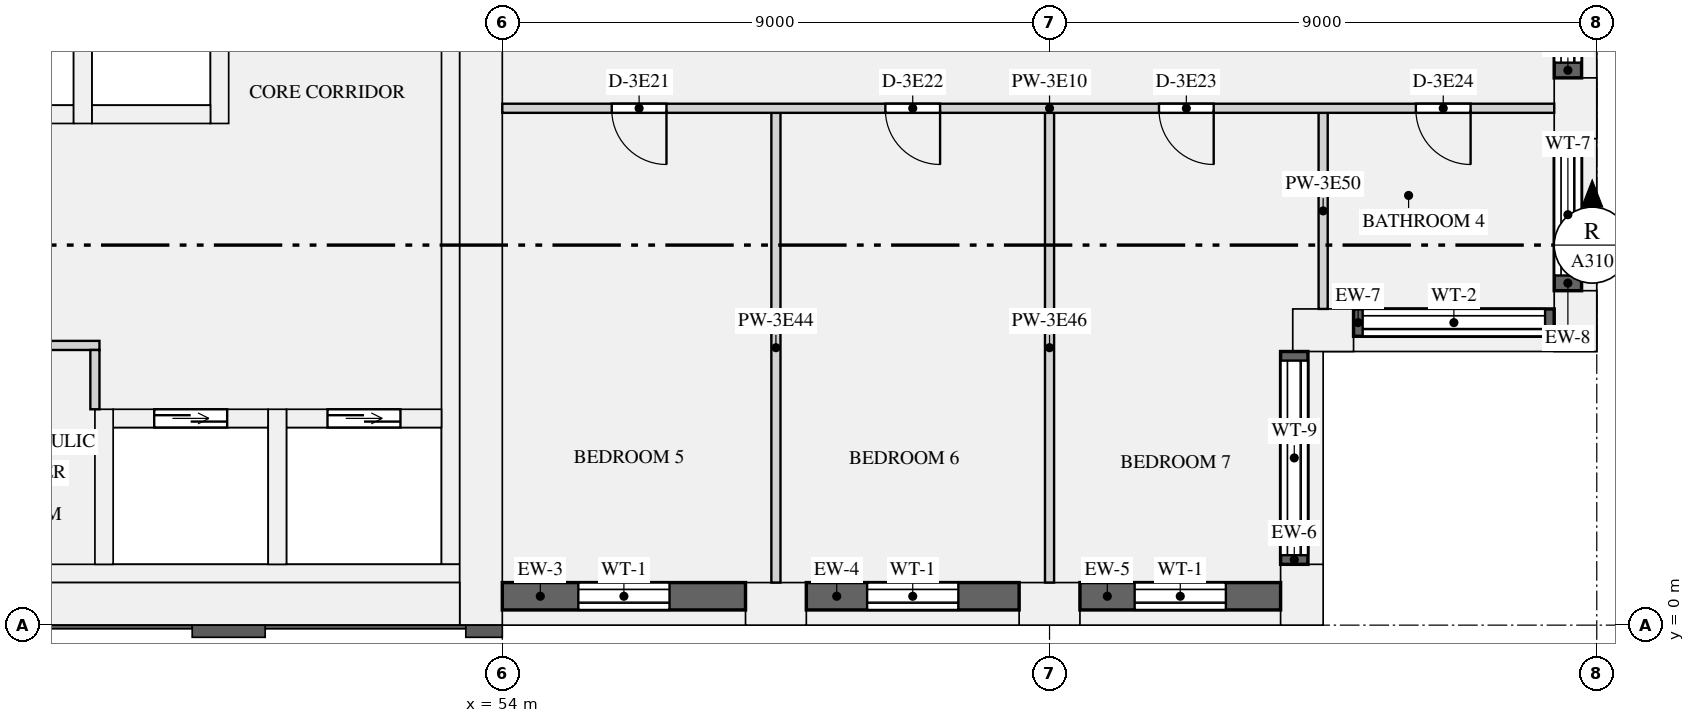
"""IFC4 building model, lengths in metres.
Left out: names, types, materials, properties, quantities, classifications, styles, units other than length and angle.
Written with IfcOpenShell. Run it as: python <this file> out.ifc"""

import sys

from ifc_helpers import new_model, si_unit, direction, frame, frame_2d, origin, origin_2d, place, context, subcontext, project, spatial, rectangle, extrude, element, fill, save


model = new_model("IFC4")
c1 = context("Model", 3, precision=1e-05, world=origin(), true_north=direction((0.0, 1.0)))
c2 = subcontext(c1, "Body", "Model", "MODEL_VIEW")
j1 = project(units=[si_unit("LENGTHUNIT", "METRE"), si_unit("PLANEANGLEUNIT", "RADIAN")], contexts=[c1])
p1 = place(None, origin())
s1 = spatial("IfcSite", under=j1, at=p1, CompositionType="ELEMENT")
p2 = place(p1, origin())
s2 = spatial("IfcBuilding", under=s1, at=p2, CompositionType="ELEMENT")
p3 = place(p2, frame((0.0, 0.0, 172.8)))
s3 = spatial("IfcBuildingStorey", under=s2, at=p3, CompositionType="ELEMENT", Elevation=172.8)
for number, where, z_axis, x_axis in (
    (1, (58.5, 0.35, 0.0), (0.0, 0.0, 1.0), (1.0, 0.0, 0.0)),
    (2, (63.0, 0.35, 0.0), (0.0, 0.0, 1.0), (1.0, 0.0, 0.0)),
    (3, (67.15, 0.5, 0.0), (0.0, 0.0, 1.0), (0.0, 1.0, 0.0)),
    (4, (67.5, 4.85, 0.0), (0.0, 0.0, 1.0), (1.0, 0.0, 0.0)),
    (5, (71.65, 5.0, 0.0), (0.0, 0.0, 1.0), (0.0, 1.0, 0.0)),
    (6, (71.65, 8.5, 0.0), (0.0, 0.0, 1.0), (0.0, 1.0, 0.0)),
):
    element("IfcColumn", number, at=place(p3, frame(where, z_axis=z_axis, x_axis=x_axis)), inside=s3, PredefinedType="USERDEFINED", context=c2, shape_type="SweptSolid", body=[
        extrude(rectangle(XDim=1.0, YDim=0.7, at=origin_2d()), origin(), (0.0, 0.0, 1.0), 3.15),
    ])
p4 = place(p3, frame((53.65, 0.0, 0.0), z_axis=(0.0, 0.0, 1.0), x_axis=(0.0, 1.0, 0.0)))
e7 = element("IfcWall", 7, at=p4, inside=s3, PredefinedType="SHEAR", context=c2, shape_type="SweptSolid", body=[
    extrude(rectangle(XDim=12.5, YDim=0.7, at=frame_2d((6.25, 0.0))), origin(), (0.0, 0.0, 1.0), 3.15),
])
p5 = place(p3, frame((18.7, 0.35, 0.0), z_axis=(0.0, 0.0, 1.0), x_axis=(1.0, 0.0, 0.0)))
e8 = element("IfcWall", 8, at=p5, inside=s3, PredefinedType="SHEAR", context=c2, shape_type="SweptSolid", body=[
    extrude(rectangle(XDim=34.6, YDim=0.7, at=frame_2d((17.3, 0.0))), origin(), (0.0, 0.0, 1.0), 3.15),
])
p6 = place(p3, frame((53.15, 1.0, 0.0), z_axis=(0.0, 0.0, 1.0), x_axis=(0.0, 1.0, 0.0)))
e9 = element("IfcWall", 9, at=p6, inside=s3, PredefinedType="SHEAR", context=c2, shape_type="SweptSolid", body=[
    extrude(rectangle(XDim=10.9, YDim=0.3, at=frame_2d((5.45, 0.0))), origin(), (0.0, 0.0, 1.0), 3.15),
])
p7 = place(p3, frame((18.7, 0.85, 0.0), z_axis=(0.0, 0.0, 1.0), x_axis=(1.0, 0.0, 0.0)))
e10 = element("IfcWall", 10, at=p7, inside=s3, PredefinedType="SHEAR", context=c2, shape_type="SweptSolid", body=[
    extrude(rectangle(XDim=34.6, YDim=0.3, at=frame_2d((17.3, 0.0))), origin(), (0.0, 0.0, 1.0), 3.15),
])
for number, where, z_axis, x_axis in (
    (11, (45.0, 8.4, 0.0), (0.0, 0.0, 1.0), (1.0, 0.0, 0.0)),
    (12, (47.25, 8.4, 0.0), (0.0, 0.0, 1.0), (1.0, 0.0, 0.0)),
):
    element("IfcWall", number, at=place(p3, frame(where, z_axis=z_axis, x_axis=x_axis)), inside=s3, PredefinedType="SHEAR", context=c2, shape_type="SweptSolid", body=[
        extrude(rectangle(XDim=1.95, YDim=0.3, at=frame_2d((0.975, 0.0))), origin(), (0.0, 0.0, 1.0), 3.15),
    ])
for number, where, z_axis, x_axis in (
    (13, (47.1, 8.25, 0.0), (0.0, 0.0, 1.0), (0.0, 1.0, 0.0)),
    (14, (49.35, 8.25, 0.0), (0.0, 0.0, 1.0), (0.0, 1.0, 0.0)),
):
    element("IfcWall", number, at=place(p3, frame(where, z_axis=z_axis, x_axis=x_axis)), inside=s3, PredefinedType="SHEAR", context=c2, shape_type="SweptSolid", body=[
        extrude(rectangle(XDim=3.65, YDim=0.3, at=frame_2d((1.825, 0.0))), origin(), (0.0, 0.0, 1.0), 3.15),
    ])
p8 = place(p3, frame((47.6, 3.4, 0.0), z_axis=(0.0, 0.0, 1.0), x_axis=(1.0, 0.0, 0.0)))
e15 = element("IfcWall", 15, at=p8, inside=s3, PredefinedType="SHEAR", context=c2, shape_type="SweptSolid", body=[
    extrude(rectangle(XDim=2.55, YDim=0.3, at=frame_2d((1.275, 0.0))), origin(), (0.0, 0.0, 1.0), 3.15),
])
p9 = place(p8, frame((0.675, 0.0, 0.0)))
e16 = element("IfcOpeningElement", 16, at=p9, cuts=e15, PredefinedType="OPENING", context=c2, shape_type="SweptSolid", body=[
    extrude(rectangle(XDim=1.2, YDim=2.1, at=frame_2d((0.6, 1.05))), frame((0.0, 0.16, 0.0), z_axis=(0.0, -1.0, 0.0), x_axis=(1.0, 0.0, 0.0)), (0.0, 0.0, 1.0), 0.32),
])
p10 = place(p3, frame((47.45, 1.0, 0.0), z_axis=(0.0, 0.0, 1.0), x_axis=(0.0, 1.0, 0.0)))
e17 = element("IfcWall", 17, at=p10, inside=s3, PredefinedType="SHEAR", context=c2, shape_type="SweptSolid", body=[
    extrude(rectangle(XDim=2.55, YDim=0.3, at=frame_2d((1.275, 0.0))), origin(), (0.0, 0.0, 1.0), 3.15),
])
p11 = place(p3, frame((50.45, 3.4, 0.0), z_axis=(0.0, 0.0, 1.0), x_axis=(1.0, 0.0, 0.0)))
e18 = element("IfcWall", 18, at=p11, inside=s3, PredefinedType="SHEAR", context=c2, shape_type="SweptSolid", body=[
    extrude(rectangle(XDim=2.55, YDim=0.3, at=frame_2d((1.275, 0.0))), origin(), (0.0, 0.0, 1.0), 3.15),
])
p12 = place(p11, frame((0.675, 0.0, 0.0)))
e19 = element("IfcOpeningElement", 19, at=p12, cuts=e18, PredefinedType="OPENING", context=c2, shape_type="SweptSolid", body=[
    extrude(rectangle(XDim=1.2, YDim=2.1, at=frame_2d((0.6, 1.05))), frame((0.0, 0.16, 0.0), z_axis=(0.0, -1.0, 0.0), x_axis=(1.0, 0.0, 0.0)), (0.0, 0.0, 1.0), 0.32),
])
p13 = place(p3, frame((50.3, 1.0, 0.0), z_axis=(0.0, 0.0, 1.0), x_axis=(0.0, 1.0, 0.0)))
e20 = element("IfcWall", 20, at=p13, inside=s3, PredefinedType="SHEAR", context=c2, shape_type="SweptSolid", body=[
    extrude(rectangle(XDim=2.55, YDim=0.3, at=frame_2d((1.275, 0.0))), origin(), (0.0, 0.0, 1.0), 3.15),
])
p14 = place(p3, frame((54.0, 0.475, 0.9), z_axis=(0.0, 0.0, 1.0), x_axis=(1.0, 0.0, 0.0)))
e21 = element("IfcWall", 21, at=p14, inside=s3, PredefinedType="SOLIDWALL", context=c2, shape_type="SweptSolid", body=[
    extrude(rectangle(XDim=4.0, YDim=0.45, at=frame_2d((2.0, 0.0))), origin(), (0.0, 0.0, 1.0), 1.93),
])
p15 = place(p14, frame((1.25, 0.0, 0.15)))
e22 = element("IfcOpeningElement", 22, at=p15, cuts=e21, PredefinedType="OPENING", context=c2, shape_type="SweptSolid", body=[
    extrude(rectangle(XDim=1.5, YDim=1.5, at=frame_2d((0.75, 0.75))), frame((0.0, 0.235, 0.0), z_axis=(0.0, -1.0, 0.0), x_axis=(1.0, 0.0, 0.0)), (0.0, 0.0, 1.0), 0.47),
])
p16 = place(p3, frame((59.0, 0.475, 0.9), z_axis=(0.0, 0.0, 1.0), x_axis=(1.0, 0.0, 0.0)))
e23 = element("IfcWall", 23, at=p16, inside=s3, PredefinedType="SOLIDWALL", context=c2, shape_type="SweptSolid", body=[
    extrude(rectangle(XDim=3.5, YDim=0.45, at=frame_2d((1.75, 0.0))), origin(), (0.0, 0.0, 1.0), 1.93),
])
p17 = place(p16, frame((1.0, 0.0, 0.15)))
e24 = element("IfcOpeningElement", 24, at=p17, cuts=e23, PredefinedType="OPENING", context=c2, shape_type="SweptSolid", body=[
    extrude(rectangle(XDim=1.5, YDim=1.5, at=frame_2d((0.75, 0.75))), frame((0.0, 0.235, 0.0), z_axis=(0.0, -1.0, 0.0), x_axis=(1.0, 0.0, 0.0)), (0.0, 0.0, 1.0), 0.47),
])
p18 = place(p3, frame((63.5, 0.475, 0.9), z_axis=(0.0, 0.0, 1.0), x_axis=(1.0, 0.0, 0.0)))
e25 = element("IfcWall", 25, at=p18, inside=s3, PredefinedType="SOLIDWALL", context=c2, shape_type="SweptSolid", body=[
    extrude(rectangle(XDim=3.3, YDim=0.45, at=frame_2d((1.65, 0.0))), origin(), (0.0, 0.0, 1.0), 1.93),
])
p19 = place(p18, frame((0.9, 0.0, 0.15)))
e26 = element("IfcOpeningElement", 26, at=p19, cuts=e25, PredefinedType="OPENING", context=c2, shape_type="SweptSolid", body=[
    extrude(rectangle(XDim=1.5, YDim=1.5, at=frame_2d((0.75, 0.75))), frame((0.0, 0.235, 0.0), z_axis=(0.0, -1.0, 0.0), x_axis=(1.0, 0.0, 0.0)), (0.0, 0.0, 1.0), 0.47),
])
p20 = place(p3, frame((67.025, 1.0, 0.9), z_axis=(0.0, 0.0, 1.0), x_axis=(0.0, 1.0, 0.0)))
e27 = element("IfcWall", 27, at=p20, inside=s3, PredefinedType="SOLIDWALL", context=c2, shape_type="SweptSolid", body=[
    extrude(rectangle(XDim=3.5, YDim=0.45, at=frame_2d((1.75, 0.0))), origin(), (0.0, 0.0, 1.0), 1.93),
])
p21 = place(p20, frame((0.15, 0.0, 0.15)))
e28 = element("IfcOpeningElement", 28, at=p21, cuts=e27, PredefinedType="OPENING", context=c2, shape_type="SweptSolid", body=[
    extrude(rectangle(XDim=3.2, YDim=1.5, at=frame_2d((1.6, 0.75))), frame((0.0, 0.235, 0.0), z_axis=(0.0, -1.0, 0.0), x_axis=(1.0, 0.0, 0.0)), (0.0, 0.0, 1.0), 0.47),
])
p22 = place(p3, frame((68.0, 4.975, 0.9), z_axis=(0.0, 0.0, 1.0), x_axis=(1.0, 0.0, 0.0)))
e29 = element("IfcWall", 29, at=p22, inside=s3, PredefinedType="SOLIDWALL", context=c2, shape_type="SweptSolid", body=[
    extrude(rectangle(XDim=3.3, YDim=0.45, at=frame_2d((1.65, 0.0))), origin(), (0.0, 0.0, 1.0), 1.93),
])
p23 = place(p22, frame((0.15, 0.0, 0.15)))
e30 = element("IfcOpeningElement", 30, at=p23, cuts=e29, PredefinedType="OPENING", context=c2, shape_type="SweptSolid", body=[
    extrude(rectangle(XDim=3.0, YDim=1.5, at=frame_2d((1.5, 0.75))), frame((0.0, 0.235, 0.0), z_axis=(0.0, -1.0, 0.0), x_axis=(1.0, 0.0, 0.0)), (0.0, 0.0, 1.0), 0.47),
])
p24 = place(p3, frame((71.525, 5.5, 0.9), z_axis=(0.0, 0.0, 1.0), x_axis=(0.0, 1.0, 0.0)))
e31 = element("IfcWall", 31, at=p24, inside=s3, PredefinedType="SOLIDWALL", context=c2, shape_type="SweptSolid", body=[
    extrude(rectangle(XDim=2.5, YDim=0.45, at=frame_2d((1.25, 0.0))), origin(), (0.0, 0.0, 1.0), 1.93),
])
p25 = place(p24, frame((0.25, 0.0, 0.15)))
e32 = element("IfcOpeningElement", 32, at=p25, cuts=e31, PredefinedType="OPENING", context=c2, shape_type="SweptSolid", body=[
    extrude(rectangle(XDim=2.0, YDim=1.5, at=frame_2d((1.0, 0.75))), frame((0.0, 0.235, 0.0), z_axis=(0.0, -1.0, 0.0), x_axis=(1.0, 0.0, 0.0)), (0.0, 0.0, 1.0), 0.47),
])
p26 = place(p3, frame((71.525, 9.0, 0.9), z_axis=(0.0, 0.0, 1.0), x_axis=(0.0, 1.0, 0.0)))
e33 = element("IfcWall", 33, at=p26, inside=s3, PredefinedType="SOLIDWALL", context=c2, shape_type="SweptSolid", body=[
    extrude(rectangle(XDim=3.0, YDim=0.45, at=frame_2d((1.5, 0.0))), origin(), (0.0, 0.0, 1.0), 1.93),
])
p27 = place(p26, frame((0.25, 0.0, 0.15)))
e34 = element("IfcOpeningElement", 34, at=p27, cuts=e33, PredefinedType="OPENING", context=c2, shape_type="SweptSolid", body=[
    extrude(rectangle(XDim=2.5, YDim=1.5, at=frame_2d((1.25, 0.75))), frame((0.0, 0.235, 0.0), z_axis=(0.0, -1.0, 0.0), x_axis=(1.0, 0.0, 0.0)), (0.0, 0.0, 1.0), 0.47),
])
p28 = place(p3, frame((44.7, 4.6, 0.0), z_axis=(0.0, 0.0, 1.0), x_axis=(1.0, 0.0, 0.0)))
e35 = element("IfcWall", 35, at=p28, inside=s3, PredefinedType="PARTITIONING", context=c2, shape_type="SweptSolid", body=[
    extrude(rectangle(XDim=2.675, YDim=0.15, at=frame_2d((1.337, 0.0))), origin(), (0.0, 0.0, 1.0), 2.83),
])
p29 = place(p28, frame((0.35, 0.0, 0.0)))
e36 = element("IfcOpeningElement", 36, at=p29, cuts=e35, PredefinedType="OPENING", context=c2, shape_type="SweptSolid", body=[
    extrude(rectangle(XDim=0.9, YDim=2.1, at=frame_2d((0.45, 1.05))), frame((0.0, 0.085, 0.0), z_axis=(0.0, -1.0, 0.0), x_axis=(1.0, 0.0, 0.0)), (0.0, 0.0, 1.0), 0.17),
])
p30 = place(p3, frame((47.3, 3.55, 0.0), z_axis=(0.0, 0.0, 1.0), x_axis=(0.0, 1.0, 0.0)))
e37 = element("IfcWall", 37, at=p30, inside=s3, PredefinedType="PARTITIONING", context=c2, shape_type="SweptSolid", body=[
    extrude(rectangle(XDim=0.975, YDim=0.15, at=frame_2d((0.487, 0.0))), origin(), (0.0, 0.0, 1.0), 2.83),
])
p31 = place(p3, frame((54.0, 8.5, 0.0), z_axis=(0.0, 0.0, 1.0), x_axis=(1.0, 0.0, 0.0)))
e38 = element("IfcWall", 38, at=p31, inside=s3, PredefinedType="PARTITIONING", context=c2, shape_type="SweptSolid", body=[
    extrude(rectangle(XDim=17.3, YDim=0.15, at=frame_2d((8.65, 0.0))), origin(), (0.0, 0.0, 1.0), 2.83),
])
p32 = place(p31, frame((1.8, 0.0, 0.0)))
e39 = element("IfcOpeningElement", 39, at=p32, cuts=e38, PredefinedType="OPENING", context=c2, shape_type="SweptSolid", body=[
    extrude(rectangle(XDim=0.9, YDim=2.1, at=frame_2d((0.45, 1.05))), frame((0.0, 0.085, 0.0), z_axis=(0.0, -1.0, 0.0), x_axis=(1.0, 0.0, 0.0)), (0.0, 0.0, 1.0), 0.17),
])
p33 = place(p31, frame((6.3, 0.0, 0.0)))
e40 = element("IfcOpeningElement", 40, at=p33, cuts=e38, PredefinedType="OPENING", context=c2, shape_type="SweptSolid", body=[
    extrude(rectangle(XDim=0.9, YDim=2.1, at=frame_2d((0.45, 1.05))), frame((0.0, 0.085, 0.0), z_axis=(0.0, -1.0, 0.0), x_axis=(1.0, 0.0, 0.0)), (0.0, 0.0, 1.0), 0.17),
])
p34 = place(p31, frame((10.8, 0.0, 0.0)))
e41 = element("IfcOpeningElement", 41, at=p34, cuts=e38, PredefinedType="OPENING", context=c2, shape_type="SweptSolid", body=[
    extrude(rectangle(XDim=0.9, YDim=2.1, at=frame_2d((0.45, 1.05))), frame((0.0, 0.085, 0.0), z_axis=(0.0, -1.0, 0.0), x_axis=(1.0, 0.0, 0.0)), (0.0, 0.0, 1.0), 0.17),
])
p35 = place(p31, frame((15.025, 0.0, 0.0)))
e42 = element("IfcOpeningElement", 42, at=p35, cuts=e38, PredefinedType="OPENING", context=c2, shape_type="SweptSolid", body=[
    extrude(rectangle(XDim=0.9, YDim=2.1, at=frame_2d((0.45, 1.05))), frame((0.0, 0.085, 0.0), z_axis=(0.0, -1.0, 0.0), x_axis=(1.0, 0.0, 0.0)), (0.0, 0.0, 1.0), 0.17),
])
for number, where, z_axis, x_axis in (
    (43, (58.5, 0.7, 0.0), (0.0, 0.0, 1.0), (0.0, 1.0, 0.0)),
    (44, (63.0, 0.7, 0.0), (0.0, 0.0, 1.0), (0.0, 1.0, 0.0)),
):
    element("IfcWall", number, at=place(p3, frame(where, z_axis=z_axis, x_axis=x_axis)), inside=s3, PredefinedType="PARTITIONING", context=c2, shape_type="SweptSolid", body=[
        extrude(rectangle(XDim=7.725, YDim=0.15, at=frame_2d((3.863, 0.0))), origin(), (0.0, 0.0, 1.0), 2.83),
    ])
p36 = place(p3, frame((67.5, 5.2, 0.0), z_axis=(0.0, 0.0, 1.0), x_axis=(0.0, 1.0, 0.0)))
e45 = element("IfcWall", 45, at=p36, inside=s3, PredefinedType="PARTITIONING", context=c2, shape_type="SweptSolid", body=[
    extrude(rectangle(XDim=3.225, YDim=0.15, at=frame_2d((1.613, 0.0))), origin(), (0.0, 0.0, 1.0), 2.83),
])
p37 = place(p15, origin())
e46 = element("IfcWindow", 46, at=p37, inside=s3, PartitioningType="SINGLE_PANEL", PredefinedType="WINDOW", context=c2, shape_type="SweptSolid", body=[
    extrude(rectangle(XDim=1.5, YDim=1.5, at=frame_2d((0.75, 0.75))), frame((0.0, -0.065, 0.0), z_axis=(0.0, -1.0, 0.0), x_axis=(1.0, 0.0, 0.0)), (0.0, 0.0, 1.0), 0.06),
])
fill(e22, e46)
p38 = place(p17, origin())
e47 = element("IfcWindow", 47, at=p38, inside=s3, PartitioningType="SINGLE_PANEL", PredefinedType="WINDOW", context=c2, shape_type="SweptSolid", body=[
    extrude(rectangle(XDim=1.5, YDim=1.5, at=frame_2d((0.75, 0.75))), frame((0.0, -0.065, 0.0), z_axis=(0.0, -1.0, 0.0), x_axis=(1.0, 0.0, 0.0)), (0.0, 0.0, 1.0), 0.06),
])
fill(e24, e47)
p39 = place(p19, origin())
e48 = element("IfcWindow", 48, at=p39, inside=s3, PartitioningType="SINGLE_PANEL", PredefinedType="WINDOW", context=c2, shape_type="SweptSolid", body=[
    extrude(rectangle(XDim=1.5, YDim=1.5, at=frame_2d((0.75, 0.75))), frame((0.0, -0.065, 0.0), z_axis=(0.0, -1.0, 0.0), x_axis=(1.0, 0.0, 0.0)), (0.0, 0.0, 1.0), 0.06),
])
fill(e26, e48)
p40 = place(p21, origin())
e49 = element("IfcWindow", 49, at=p40, inside=s3, PartitioningType="SINGLE_PANEL", PredefinedType="WINDOW", context=c2, shape_type="SweptSolid", body=[
    extrude(rectangle(XDim=3.2, YDim=1.5, at=frame_2d((1.6, 0.75))), frame((0.0, -0.065, 0.0), z_axis=(0.0, -1.0, 0.0), x_axis=(1.0, 0.0, 0.0)), (0.0, 0.0, 1.0), 0.06),
])
fill(e28, e49)
p41 = place(p23, origin())
e50 = element("IfcWindow", 50, at=p41, inside=s3, PartitioningType="SINGLE_PANEL", PredefinedType="WINDOW", context=c2, shape_type="SweptSolid", body=[
    extrude(rectangle(XDim=3.0, YDim=1.5, at=frame_2d((1.5, 0.75))), frame((0.0, -0.065, 0.0), z_axis=(0.0, -1.0, 0.0), x_axis=(1.0, 0.0, 0.0)), (0.0, 0.0, 1.0), 0.06),
])
fill(e30, e50)
p42 = place(p25, origin())
e51 = element("IfcWindow", 51, at=p42, inside=s3, PartitioningType="SINGLE_PANEL", PredefinedType="WINDOW", context=c2, shape_type="SweptSolid", body=[
    extrude(rectangle(XDim=2.0, YDim=1.5, at=frame_2d((1.0, 0.75))), frame((0.0, -0.065, 0.0), z_axis=(0.0, -1.0, 0.0), x_axis=(1.0, 0.0, 0.0)), (0.0, 0.0, 1.0), 0.06),
])
fill(e32, e51)
p43 = place(p27, origin())
e52 = element("IfcWindow", 52, at=p43, inside=s3, PartitioningType="SINGLE_PANEL", PredefinedType="WINDOW", context=c2, shape_type="SweptSolid", body=[
    extrude(rectangle(XDim=2.5, YDim=1.5, at=frame_2d((1.25, 0.75))), frame((0.0, -0.065, 0.0), z_axis=(0.0, -1.0, 0.0), x_axis=(1.0, 0.0, 0.0)), (0.0, 0.0, 1.0), 0.06),
])
fill(e34, e52)
p44 = place(p9, origin())
e53 = element("IfcDoor", 53, at=p44, inside=s3, OperationType="DOUBLE_DOOR_SLIDING", PredefinedType="DOOR", context=c2, shape_type="SweptSolid", body=[
    extrude(rectangle(XDim=1.2, YDim=2.1, at=frame_2d((0.6, 1.05))), frame((0.0, 0.025, 0.0), z_axis=(0.0, -1.0, 0.0), x_axis=(1.0, 0.0, 0.0)), (0.0, 0.0, 1.0), 0.05),
])
fill(e16, e53)
p45 = place(p12, origin())
e54 = element("IfcDoor", 54, at=p45, inside=s3, OperationType="DOUBLE_DOOR_SLIDING", PredefinedType="DOOR", context=c2, shape_type="SweptSolid", body=[
    extrude(rectangle(XDim=1.2, YDim=2.1, at=frame_2d((0.6, 1.05))), frame((0.0, 0.025, 0.0), z_axis=(0.0, -1.0, 0.0), x_axis=(1.0, 0.0, 0.0)), (0.0, 0.0, 1.0), 0.05),
])
fill(e19, e54)
p46 = place(p32, frame((0.9, 0.0, 0.0), z_axis=(0.0, 0.0, 1.0), x_axis=(-1.0, 0.0, 0.0)))
e55 = element("IfcDoor", 55, at=p46, inside=s3, OperationType="SINGLE_SWING_LEFT", PredefinedType="DOOR", context=c2, shape_type="SweptSolid", body=[
    extrude(rectangle(XDim=0.9, YDim=2.1, at=frame_2d((0.45, 1.05))), frame((0.0, 0.025, 0.0), z_axis=(0.0, -1.0, 0.0), x_axis=(1.0, 0.0, 0.0)), (0.0, 0.0, 1.0), 0.05),
])
fill(e39, e55)
p47 = place(p33, frame((0.9, 0.0, 0.0), z_axis=(0.0, 0.0, 1.0), x_axis=(-1.0, 0.0, 0.0)))
e56 = element("IfcDoor", 56, at=p47, inside=s3, OperationType="SINGLE_SWING_LEFT", PredefinedType="DOOR", context=c2, shape_type="SweptSolid", body=[
    extrude(rectangle(XDim=0.9, YDim=2.1, at=frame_2d((0.45, 1.05))), frame((0.0, 0.025, 0.0), z_axis=(0.0, -1.0, 0.0), x_axis=(1.0, 0.0, 0.0)), (0.0, 0.0, 1.0), 0.05),
])
fill(e40, e56)
p48 = place(p34, frame((0.9, 0.0, 0.0), z_axis=(0.0, 0.0, 1.0), x_axis=(-1.0, 0.0, 0.0)))
e57 = element("IfcDoor", 57, at=p48, inside=s3, OperationType="SINGLE_SWING_LEFT", PredefinedType="DOOR", context=c2, shape_type="SweptSolid", body=[
    extrude(rectangle(XDim=0.9, YDim=2.1, at=frame_2d((0.45, 1.05))), frame((0.0, 0.025, 0.0), z_axis=(0.0, -1.0, 0.0), x_axis=(1.0, 0.0, 0.0)), (0.0, 0.0, 1.0), 0.05),
])
fill(e41, e57)
p49 = place(p35, frame((0.9, 0.0, 0.0), z_axis=(0.0, 0.0, 1.0), x_axis=(-1.0, 0.0, 0.0)))
e58 = element("IfcDoor", 58, at=p49, inside=s3, OperationType="SINGLE_SWING_LEFT", PredefinedType="DOOR", context=c2, shape_type="SweptSolid", body=[
    extrude(rectangle(XDim=0.9, YDim=2.1, at=frame_2d((0.45, 1.05))), frame((0.0, 0.025, 0.0), z_axis=(0.0, -1.0, 0.0), x_axis=(1.0, 0.0, 0.0)), (0.0, 0.0, 1.0), 0.05),
])
fill(e42, e58)
save(model, sys.argv[1])
